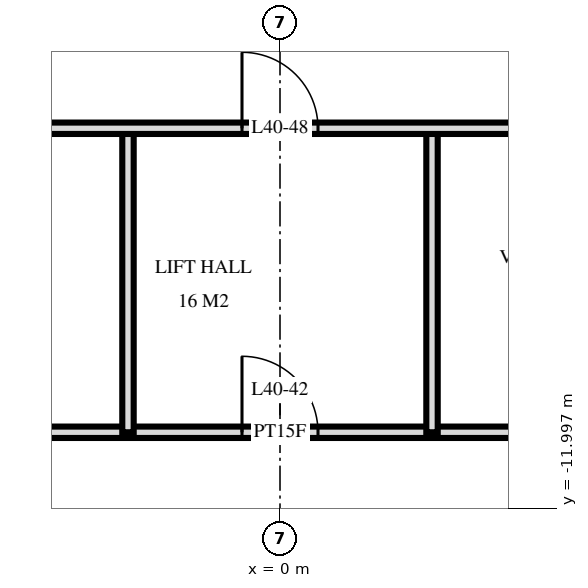
"""IFC4 building model, lengths in metres.
Left out: names, types, materials, properties, quantities, classifications, styles, units other than length and angle.
Written with IfcOpenShell. Run it as: python <this file> out.ifc"""

import sys

from ifc_helpers import new_model, si_unit, direction, frame, frame_2d, origin, place, context, subcontext, project, spatial, rectangle, extrude, element, fill, save


model = new_model("IFC4")
c1 = context("Model", 3, precision=1e-05, world=origin(), true_north=direction((0.0, 1.0)))
c2 = subcontext(c1, "Body", "Model", "MODEL_VIEW")
j1 = project(units=[si_unit("LENGTHUNIT", "METRE"), si_unit("PLANEANGLEUNIT", "RADIAN")], contexts=[c1])
p1 = place(None, origin())
s1 = spatial("IfcSite", under=j1, at=p1, CompositionType="ELEMENT")
p2 = place(p1, origin())
s2 = spatial("IfcBuilding", under=s1, at=p2, CompositionType="ELEMENT")
p3 = place(p2, frame((0.0, 0.0, 156.0)))
s3 = spatial("IfcBuildingStorey", under=s2, at=p3, CompositionType="ELEMENT", Elevation=156.0)
for number, where, z_axis, x_axis in (
    (1, (2.0, -11.0, 0.0), (0.0, 0.0, 1.0), (0.0, 1.0, 0.0)),
    (2, (-2.0, -11.0, 0.0), (0.0, 0.0, 1.0), (0.0, 1.0, 0.0)),
):
    element("IfcWall", number, at=place(p3, frame(where, z_axis=z_axis, x_axis=x_axis)), inside=s3, PredefinedType="PARTITIONING", context=c2, shape_type="SweptSolid", body=[
        extrude(rectangle(XDim=4.0, YDim=0.15, at=frame_2d((2.0, 0.0))), origin(), (0.0, 0.0, 1.0), 3.32),
    ])
p4 = place(p3, frame((-9.95, -11.0, 0.0), z_axis=(0.0, 0.0, 1.0), x_axis=(1.0, 0.0, 0.0)))
e3 = element("IfcWall", 3, at=p4, inside=s3, PredefinedType="PARTITIONING", context=c2, shape_type="SweptSolid", body=[
    extrude(rectangle(XDim=19.9, YDim=0.15, at=frame_2d((9.95, 0.0))), origin(), (0.0, 0.0, 1.0), 3.32),
])
p5 = place(p4, frame((9.45, 0.0, 0.0)))
e4 = element("IfcOpeningElement", 4, at=p5, cuts=e3, PredefinedType="OPENING", context=c2, shape_type="SweptSolid", body=[
    extrude(rectangle(XDim=1.0, YDim=2.1, at=frame_2d((0.5, 1.05))), frame((0.0, 0.085, 0.0), z_axis=(0.0, -1.0, 0.0), x_axis=(1.0, 0.0, 0.0)), (0.0, 0.0, 1.0), 0.17),
])
p6 = place(p4, frame((15.45, 0.0, 0.0)))
e5 = element("IfcOpeningElement", 5, at=p6, cuts=e3, PredefinedType="OPENING", context=c2, shape_type="SweptSolid", body=[
    extrude(rectangle(XDim=1.0, YDim=2.1, at=frame_2d((0.5, 1.05))), frame((0.0, 0.085, 0.0), z_axis=(0.0, -1.0, 0.0), x_axis=(1.0, 0.0, 0.0)), (0.0, 0.0, 1.0), 0.17),
])
p7 = place(p3, frame((-9.95, -7.0, 0.0), z_axis=(0.0, 0.0, 1.0), x_axis=(1.0, 0.0, 0.0)))
e6 = element("IfcWall", 6, at=p7, inside=s3, PredefinedType="PARTITIONING", context=c2, shape_type="SweptSolid", body=[
    extrude(rectangle(XDim=19.9, YDim=0.15, at=frame_2d((9.95, 0.0))), origin(), (0.0, 0.0, 1.0), 3.32),
])
p8 = place(p7, frame((9.45, 0.0, 0.0)))
e7 = element("IfcOpeningElement", 7, at=p8, cuts=e6, PredefinedType="OPENING", context=c2, shape_type="SweptSolid", body=[
    extrude(rectangle(XDim=1.0, YDim=2.1, at=frame_2d((0.5, 1.05))), frame((0.0, 0.085, 0.0), z_axis=(0.0, -1.0, 0.0), x_axis=(1.0, 0.0, 0.0)), (0.0, 0.0, 1.0), 0.17),
])
p9 = place(p7, frame((3.45, 0.0, 0.0)))
e8 = element("IfcOpeningElement", 8, at=p9, cuts=e6, PredefinedType="OPENING", context=c2, shape_type="SweptSolid", body=[
    extrude(rectangle(XDim=1.0, YDim=2.1, at=frame_2d((0.5, 1.05))), frame((0.0, 0.085, 0.0), z_axis=(0.0, -1.0, 0.0), x_axis=(1.0, 0.0, 0.0)), (0.0, 0.0, 1.0), 0.17),
])
p10 = place(p5, origin())
e9 = element("IfcDoor", 9, at=p10, inside=s3, OperationType="SINGLE_SWING_RIGHT", PredefinedType="DOOR", context=c2, shape_type="SweptSolid", body=[
    extrude(rectangle(XDim=1.0, YDim=2.1, at=frame_2d((0.5, 1.05))), frame((0.0, 0.025, 0.0), z_axis=(0.0, -1.0, 0.0), x_axis=(1.0, 0.0, 0.0)), (0.0, 0.0, 1.0), 0.05),
])
fill(e4, e9)
p11 = place(p8, origin())
e10 = element("IfcDoor", 10, at=p11, inside=s3, OperationType="SINGLE_SWING_RIGHT", PredefinedType="DOOR", context=c2, shape_type="SweptSolid", body=[
    extrude(rectangle(XDim=1.0, YDim=2.1, at=frame_2d((0.5, 1.05))), frame((0.0, 0.025, 0.0), z_axis=(0.0, -1.0, 0.0), x_axis=(1.0, 0.0, 0.0)), (0.0, 0.0, 1.0), 0.05),
])
fill(e7, e10)
save(model, sys.argv[1])
